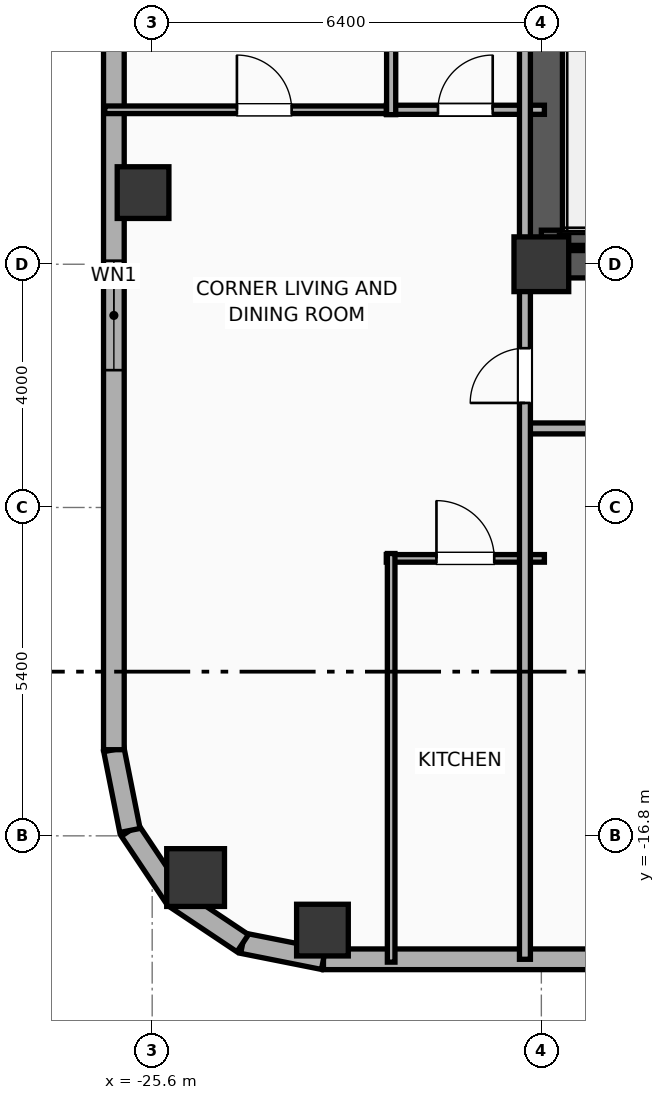
"""IFC4 building model, lengths in metres.
Left out: names, types, materials, properties, quantities, classifications, styles, units other than length and angle.
Written with IfcOpenShell. Run it as: python <this file> out.ifc"""

import sys

from ifc_helpers import new_model, si_unit, direction, frame, frame_2d, origin, origin_2d, place, context, subcontext, project, spatial, rectangle, hollow_rectangle, hollow_circle, extrude, element, fill, save


model = new_model("IFC4")
c1 = context("Model", 3, precision=1e-05, world=origin(), true_north=direction((0.0, 1.0)))
c2 = subcontext(c1, "Body", "Model", "MODEL_VIEW")
j1 = project(units=[si_unit("LENGTHUNIT", "METRE"), si_unit("PLANEANGLEUNIT", "RADIAN")], contexts=[c1])
p1 = place(None, origin())
s1 = spatial("IfcSite", under=j1, at=p1, CompositionType="ELEMENT")
p2 = place(p1, origin())
s2 = spatial("IfcBuilding", under=s1, at=p2, CompositionType="ELEMENT")
p3 = place(p2, frame((0.0, 0.0, 200.2)))
s3 = spatial("IfcBuildingStorey", under=s2, at=p3, CompositionType="ELEMENT", Elevation=200.2)
p4 = place(p3, frame((-19.2, -7.4, 0.0), z_axis=(0.0, 0.0, 1.0), x_axis=(1.0, 0.0, 0.0)))
e1 = element("IfcColumn", 1, at=p4, inside=s3, PredefinedType="COLUMN", context=c2, shape_type="SweptSolid", body=[
    extrude(rectangle(XDim=0.9, YDim=0.9, at=origin_2d()), origin(), (0.0, 0.0, 1.0), 3.9),
])
p5 = place(p3, frame((-19.425, -7.4, 0.0), z_axis=(0.0, 0.0, 1.0), x_axis=(1.0, 0.0, 0.0)))
e2 = element("IfcWall", 2, at=p5, inside=s3, PredefinedType="SHEAR", context=c2, shape_type="SweptSolid", body=[
    extrude(rectangle(XDim=7.25, YDim=0.45, at=frame_2d((3.625, 0.0))), origin(), (0.0, 0.0, 1.0), 3.65),
])
p6 = place(p3, frame((-19.145, -7.4, 0.0), z_axis=(0.0, 0.0, 1.0), x_axis=(0.0, 1.0, 0.0)))
e3 = element("IfcWall", 3, at=p6, inside=s3, PredefinedType="SHEAR", context=c2, shape_type="SweptSolid", body=[
    extrude(rectangle(XDim=14.8, YDim=0.65, at=frame_2d((7.4, 0.0))), origin(), (0.0, 0.0, 1.0), 3.65),
])
p7 = place(p3, frame((-19.2, -6.965, 0.0), z_axis=(0.0, 0.0, 1.0), x_axis=(1.0, 0.0, 0.0)))
e4 = element("IfcWall", 4, at=p7, inside=s3, PredefinedType="SOLIDWALL", context=c2, shape_type="SweptSolid", body=[
    extrude(rectangle(XDim=3.46, YDim=0.25, at=frame_2d((1.73, 0.0))), origin(), (0.0, 0.0, 1.0), 3.65),
])
for number, where, z_axis, x_axis in (
    (5, (-22.8, -18.35, 0.0), (0.0, 0.0, 1.0), (1.0, 0.0, 0.0)),
    (6, (-25.75, -6.222, 0.0), (0.0, 0.0, 1.0), (1.0, 0.0, 0.0)),
):
    element("IfcColumn", number, at=place(p3, frame(where, z_axis=z_axis, x_axis=x_axis)), inside=s3, PredefinedType="COLUMN", context=c2, shape_type="SweptSolid", body=[
        extrude(hollow_rectangle(XDim=0.85, YDim=0.85, WallThickness=0.028, at=origin_2d()), origin(), (0.0, 0.0, 1.0), 3.9),
    ])
p8 = place(p3, frame((-24.886, -17.486, 0.0), z_axis=(0.0, 0.0, 1.0), x_axis=(1.0, 0.0, 0.0)))
e7 = element("IfcColumn", 7, at=p8, inside=s3, PredefinedType="COLUMN", context=c2, shape_type="SweptSolid", body=[
    extrude(hollow_circle(Radius=0.475, WallThickness=0.032, at=origin_2d()), origin(), (0.0, 0.0, 1.0), 3.9),
])
p9 = place(p3, frame((-13.861, -18.83, 0.0), z_axis=(0.0, 0.0, 1.0), x_axis=(-1.0, 0.0, 0.0)))
e8 = element("IfcWall", 8, at=p9, inside=s3, PredefinedType="ELEMENTEDWALL", context=c2, shape_type="SweptSolid", body=[
    extrude(rectangle(XDim=8.922, YDim=0.34, at=frame_2d((4.461, 0.0))), origin(), (0.0, 0.0, 1.0), 2.54),
])
p10 = place(p3, frame((-22.783, -18.83, 0.0), z_axis=(0.0, 0.0, 1.0), x_axis=(-0.980788153188, 0.195075878998, 0.0)))
e9 = element("IfcWall", 9, at=p10, inside=s3, PredefinedType="ELEMENTEDWALL", context=c2, shape_type="SweptSolid", body=[
    extrude(rectangle(XDim=1.354, YDim=0.34, at=frame_2d((0.677, 0.0))), origin(), (0.0, 0.0, 1.0), 2.54),
])
p11 = place(p3, frame((-24.111, -18.566, 0.0), z_axis=(0.0, 0.0, 1.0), x_axis=(-0.831403586725, 0.555669034571, 0.0)))
e10 = element("IfcWall", 10, at=p11, inside=s3, PredefinedType="ELEMENTEDWALL", context=c2, shape_type="SweptSolid", body=[
    extrude(rectangle(XDim=1.337, YDim=0.34, at=frame_2d((0.668, 0.0))), origin(), (0.0, 0.0, 1.0), 2.54),
])
p12 = place(p3, frame((-25.223, -17.823, 0.0), z_axis=(0.0, 0.0, 1.0), x_axis=(-0.555584683399, 0.831459956686, 0.0)))
e11 = element("IfcWall", 11, at=p12, inside=s3, PredefinedType="ELEMENTEDWALL", context=c2, shape_type="SweptSolid", body=[
    extrude(rectangle(XDim=1.337, YDim=0.34, at=frame_2d((0.668, 0.0))), origin(), (0.0, 0.0, 1.0), 3.65),
])
p13 = place(p3, frame((-25.966, -16.711, 0.0), z_axis=(0.0, 0.0, 1.0), x_axis=(-0.195110379894, 0.98078129043, 0.0)))
e12 = element("IfcWall", 12, at=p13, inside=s3, PredefinedType="ELEMENTEDWALL", context=c2, shape_type="SweptSolid", body=[
    extrude(rectangle(XDim=1.354, YDim=0.34, at=frame_2d((0.677, 0.0))), origin(), (0.0, 0.0, 1.0), 3.65),
])
p14 = place(p3, frame((-26.23, -15.383, 0.0), z_axis=(0.0, 0.0, 1.0), x_axis=(0.0, 1.0, 0.0)))
e13 = element("IfcWall", 13, at=p14, inside=s3, PredefinedType="ELEMENTEDWALL", context=c2, shape_type="SweptSolid", body=[
    extrude(rectangle(XDim=31.967, YDim=0.34, at=frame_2d((15.983, 0.0))), origin(), (0.0, 0.0, 1.0), 2.54),
])
p15 = place(p14, frame((6.242, 0.0, 0.75)))
e14 = element("IfcOpeningElement", 14, at=p15, cuts=e13, PredefinedType="OPENING", context=c2, shape_type="SweptSolid", body=[
    extrude(rectangle(XDim=1.8, YDim=1.63, at=frame_2d((0.9, 0.815))), frame((0.0, 0.18, 0.0), z_axis=(0.0, -1.0, 0.0), x_axis=(1.0, 0.0, 0.0)), (0.0, 0.0, 1.0), 0.36),
])
p16 = place(p14, frame((23.925, 0.0, 0.75)))
e15 = element("IfcOpeningElement", 15, at=p16, cuts=e13, PredefinedType="OPENING", context=c2, shape_type="SweptSolid", body=[
    extrude(rectangle(XDim=1.8, YDim=1.63, at=frame_2d((0.9, 0.815))), frame((0.0, 0.18, 0.0), z_axis=(0.0, -1.0, 0.0), x_axis=(1.0, 0.0, 0.0)), (0.0, 0.0, 1.0), 0.36),
])
p17 = place(p14, frame((13.253, 0.0, 0.75)))
e16 = element("IfcOpeningElement", 16, at=p17, cuts=e13, PredefinedType="OPENING", context=c2, shape_type="SweptSolid", body=[
    extrude(rectangle(XDim=1.2, YDim=1.63, at=frame_2d((0.6, 0.815))), frame((0.0, 0.18, 0.0), z_axis=(0.0, -1.0, 0.0), x_axis=(1.0, 0.0, 0.0)), (0.0, 0.0, 1.0), 0.36),
])
p18 = place(p14, frame((29.348, 0.0, 0.75)))
e17 = element("IfcOpeningElement", 17, at=p18, cuts=e13, PredefinedType="OPENING", context=c2, shape_type="SweptSolid", body=[
    extrude(rectangle(XDim=1.2, YDim=1.63, at=frame_2d((0.6, 0.815))), frame((0.0, 0.18, 0.0), z_axis=(0.0, -1.0, 0.0), x_axis=(1.0, 0.0, 0.0)), (0.0, 0.0, 1.0), 0.36),
])
p19 = place(p3, frame((-19.5, -10.1, 0.0), z_axis=(0.0, 0.0, 1.0), x_axis=(1.0, 0.0, 0.0)))
e18 = element("IfcWall", 18, at=p19, inside=s3, PredefinedType="PARTITIONING", context=c2, shape_type="SweptSolid", body=[
    extrude(rectangle(XDim=11.42, YDim=0.18, at=frame_2d((5.71, 0.0))), origin(), (0.0, 0.0, 1.0), 3.65),
])
p20 = place(p19, frame((2.324, 0.0, 0.0)))
e19 = element("IfcOpeningElement", 19, at=p20, cuts=e18, PredefinedType="OPENING", context=c2, shape_type="SweptSolid", body=[
    extrude(rectangle(XDim=1.15, YDim=2.05, at=frame_2d((0.575, 1.025))), frame((0.0, 0.1, 0.0), z_axis=(0.0, -1.0, 0.0), x_axis=(1.0, 0.0, 0.0)), (0.0, 0.0, 1.0), 0.2),
])
p21 = place(p19, frame((8.323, 0.0, 0.0)))
e20 = element("IfcOpeningElement", 20, at=p21, cuts=e18, PredefinedType="OPENING", context=c2, shape_type="SweptSolid", body=[
    extrude(rectangle(XDim=0.9, YDim=2.05, at=frame_2d((0.45, 1.025))), frame((0.0, 0.1, 0.0), z_axis=(0.0, -1.0, 0.0), x_axis=(1.0, 0.0, 0.0)), (0.0, 0.0, 1.0), 0.2),
])
p22 = place(p3, frame((-26.38, -4.86, 0.0), z_axis=(0.0, 0.0, 1.0), x_axis=(1.0, 0.0, 0.0)))
e21 = element("IfcWall", 21, at=p22, inside=s3, PredefinedType="PARTITIONING", context=c2, shape_type="SweptSolid", body=[
    extrude(rectangle(XDim=4.77, YDim=0.125, at=frame_2d((2.385, 0.0))), origin(), (0.0, 0.0, 1.0), 3.65),
])
p23 = place(p22, frame((2.174, 0.0, 0.0)))
e22 = element("IfcOpeningElement", 22, at=p23, cuts=e21, PredefinedType="OPENING", context=c2, shape_type="SweptSolid", body=[
    extrude(rectangle(XDim=0.9, YDim=2.05, at=frame_2d((0.45, 1.025))), frame((0.0, 0.073, 0.0), z_axis=(0.0, -1.0, 0.0), x_axis=(1.0, 0.0, 0.0)), (0.0, 0.0, 1.0), 0.145),
])
p24 = place(p3, frame((-21.75, -12.237, 0.0), z_axis=(0.0, 0.0, 1.0), x_axis=(1.0, 0.0, 0.0)))
e23 = element("IfcWall", 23, at=p24, inside=s3, PredefinedType="PARTITIONING", context=c2, shape_type="SweptSolid", body=[
    extrude(rectangle(XDim=2.6, YDim=0.125, at=frame_2d((1.3, 0.0))), origin(), (0.0, 0.0, 1.0), 3.65),
])
p25 = place(p24, frame((0.825, 0.0, 0.0)))
e24 = element("IfcOpeningElement", 24, at=p25, cuts=e23, PredefinedType="OPENING", context=c2, shape_type="SweptSolid", body=[
    extrude(rectangle(XDim=0.95, YDim=2.05, at=frame_2d((0.475, 1.025))), frame((0.0, 0.073, 0.0), z_axis=(0.0, -1.0, 0.0), x_axis=(1.0, 0.0, 0.0)), (0.0, 0.0, 1.0), 0.145),
])
p26 = place(p3, frame((-21.75, -4.86, 0.0), z_axis=(0.0, 0.0, 1.0), x_axis=(1.0, 0.0, 0.0)))
e25 = element("IfcWall", 25, at=p26, inside=s3, PredefinedType="PLUMBINGWALL", context=c2, shape_type="SweptSolid", body=[
    extrude(rectangle(XDim=2.6, YDim=0.15, at=frame_2d((1.3, 0.0))), origin(), (0.0, 0.0, 1.0), 3.65),
])
p27 = place(p26, frame((0.85, 0.0, 0.0)))
e26 = element("IfcOpeningElement", 26, at=p27, cuts=e25, PredefinedType="OPENING", context=c2, shape_type="SweptSolid", body=[
    extrude(rectangle(XDim=0.9, YDim=2.05, at=frame_2d((0.45, 1.025))), frame((0.0, 0.085, 0.0), z_axis=(0.0, -1.0, 0.0), x_axis=(1.0, 0.0, 0.0)), (0.0, 0.0, 1.0), 0.17),
])
p28 = place(p3, frame((-21.67, -18.877, 0.0), z_axis=(0.0, 0.0, 1.0), x_axis=(0.0, 1.0, 0.0)))
e27 = element("IfcWall", 27, at=p28, inside=s3, PredefinedType="PARTITIONING", context=c2, shape_type="SweptSolid", body=[
    extrude(rectangle(XDim=6.72, YDim=0.125, at=frame_2d((3.36, 0.0))), origin(), (0.0, 0.0, 1.0), 2.54),
])
p29 = place(p3, frame((-21.67, -4.94, 0.0), z_axis=(0.0, 0.0, 1.0), x_axis=(0.0, 1.0, 0.0)))
e28 = element("IfcWall", 28, at=p29, inside=s3, PredefinedType="PLUMBINGWALL", context=c2, shape_type="SweptSolid", body=[
    extrude(rectangle(XDim=6.72, YDim=0.15, at=frame_2d((3.36, 0.0))), origin(), (0.0, 0.0, 1.0), 3.65),
])
p30 = place(p3, frame((-19.47, -18.83, 0.0), z_axis=(0.0, 0.0, 1.0), x_axis=(0.0, 1.0, 0.0)))
e29 = element("IfcWall", 29, at=p30, inside=s3, PredefinedType="PARTITIONING", context=c2, shape_type="SweptSolid", body=[
    extrude(rectangle(XDim=20.63, YDim=0.18, at=frame_2d((10.315, 0.0))), origin(), (0.0, 0.0, 1.0), 2.54),
])
p31 = place(p30, frame((9.149, 0.0, 0.0)))
e30 = element("IfcOpeningElement", 30, at=p31, cuts=e29, PredefinedType="OPENING", context=c2, shape_type="SweptSolid", body=[
    extrude(rectangle(XDim=0.9, YDim=2.05, at=frame_2d((0.45, 1.025))), frame((0.0, 0.1, 0.0), z_axis=(0.0, -1.0, 0.0), x_axis=(1.0, 0.0, 0.0)), (0.0, 0.0, 1.0), 0.2),
])
p32 = place(p15, origin())
e31 = element("IfcWindow", 31, at=p32, inside=s3, PartitioningType="SINGLE_PANEL", PredefinedType="WINDOW", context=c2, shape_type="SweptSolid", body=[
    extrude(rectangle(XDim=1.8, YDim=1.63, at=frame_2d((0.9, 0.815))), frame((0.0, 0.03, 0.0), z_axis=(0.0, -1.0, 0.0), x_axis=(1.0, 0.0, 0.0)), (0.0, 0.0, 1.0), 0.06),
])
fill(e14, e31)
p33 = place(p23, origin())
e32 = element("IfcDoor", 32, at=p33, inside=s3, OperationType="SINGLE_SWING_LEFT", PredefinedType="DOOR", context=c2, shape_type="SweptSolid", body=[
    extrude(rectangle(XDim=0.9, YDim=2.05, at=frame_2d((0.45, 1.025))), frame((0.0, 0.025, 0.0), z_axis=(0.0, -1.0, 0.0), x_axis=(1.0, 0.0, 0.0)), (0.0, 0.0, 1.0), 0.05),
])
fill(e22, e32)
p34 = place(p25, origin())
e33 = element("IfcDoor", 33, at=p34, inside=s3, OperationType="SINGLE_SWING_LEFT", PredefinedType="DOOR", context=c2, shape_type="SweptSolid", body=[
    extrude(rectangle(XDim=0.95, YDim=2.05, at=frame_2d((0.475, 1.025))), frame((0.0, 0.025, 0.0), z_axis=(0.0, -1.0, 0.0), x_axis=(1.0, 0.0, 0.0)), (0.0, 0.0, 1.0), 0.05),
])
fill(e24, e33)
p35 = place(p27, origin())
e34 = element("IfcDoor", 34, at=p35, inside=s3, OperationType="SINGLE_SWING_RIGHT", PredefinedType="DOOR", context=c2, shape_type="SweptSolid", body=[
    extrude(rectangle(XDim=0.9, YDim=2.05, at=frame_2d((0.45, 1.025))), frame((0.0, 0.025, 0.0), z_axis=(0.0, -1.0, 0.0), x_axis=(1.0, 0.0, 0.0)), (0.0, 0.0, 1.0), 0.05),
])
fill(e26, e34)
p36 = place(p31, origin())
e35 = element("IfcDoor", 35, at=p36, inside=s3, OperationType="SINGLE_SWING_LEFT", PredefinedType="DOOR", context=c2, shape_type="SweptSolid", body=[
    extrude(rectangle(XDim=0.9, YDim=2.05, at=frame_2d((0.45, 1.025))), frame((0.0, 0.025, 0.0), z_axis=(0.0, -1.0, 0.0), x_axis=(1.0, 0.0, 0.0)), (0.0, 0.0, 1.0), 0.05),
])
fill(e30, e35)
save(model, sys.argv[1])
